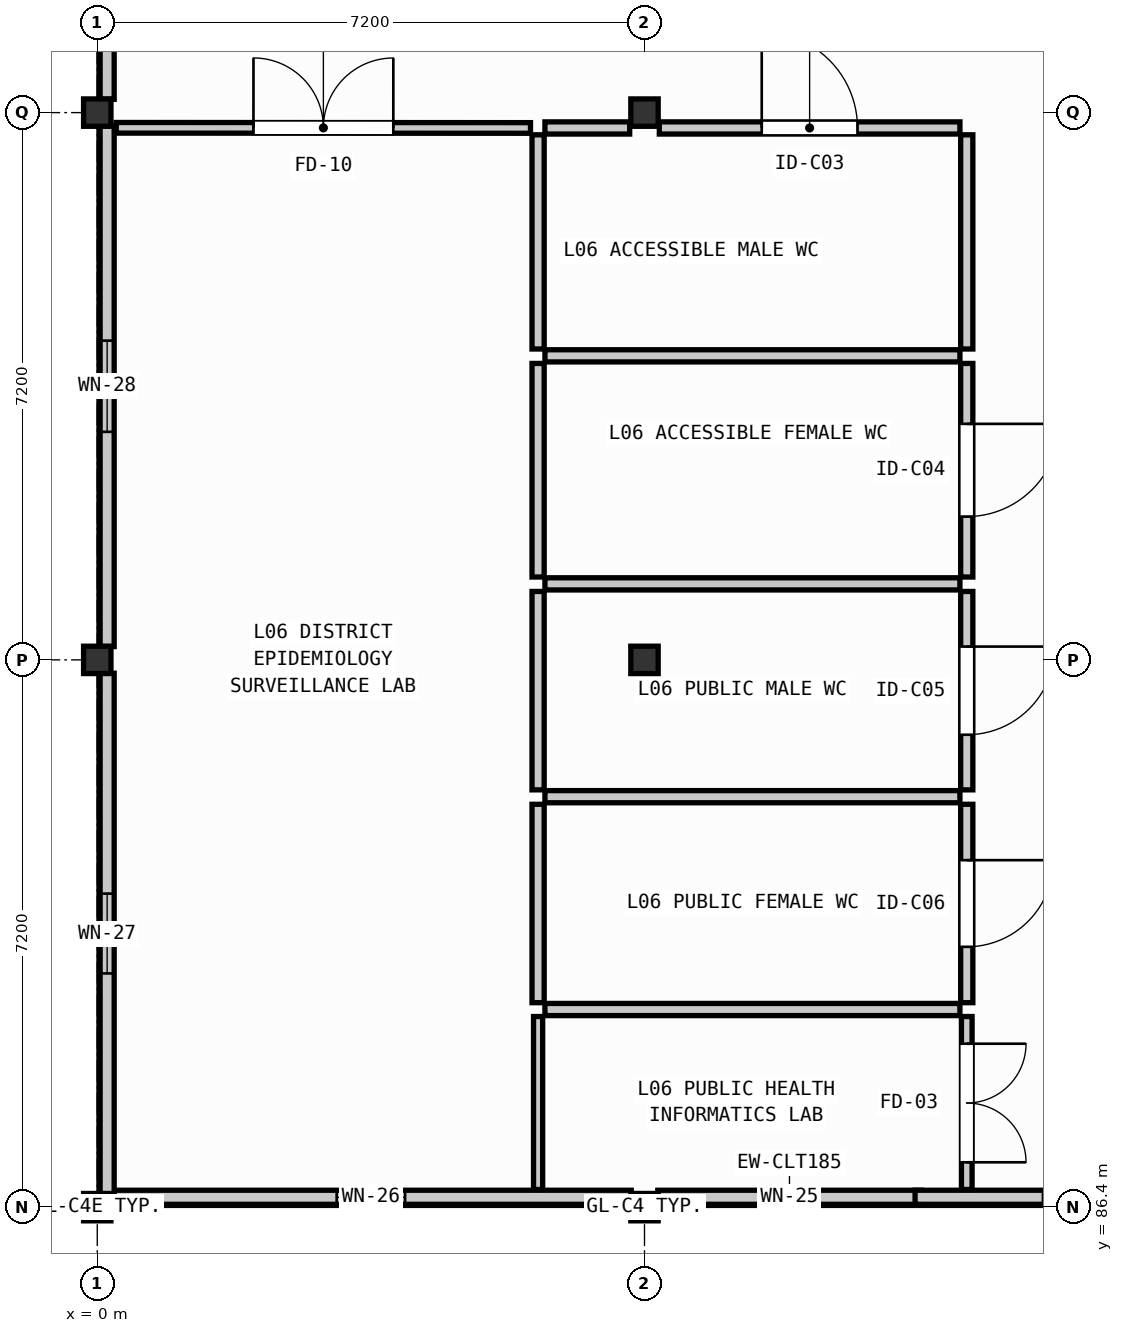
"""IFC4 building model, lengths in metres.
Left out: names, types, materials, properties, quantities, classifications, styles, units other than length and angle.
Written with IfcOpenShell. Run it as: python <this file> out.ifc"""

import sys

from ifc_helpers import new_model, si_unit, direction, frame, frame_2d, origin, origin_2d, place, context, subcontext, project, spatial, rectangle, extrude, element, fill, save


model = new_model("IFC4")
c1 = context("Model", 3, precision=1e-05, world=origin(), true_north=direction((0.0, 1.0)))
c2 = subcontext(c1, "Body", "Model", "MODEL_VIEW")
j1 = project(units=[si_unit("LENGTHUNIT", "METRE"), si_unit("PLANEANGLEUNIT", "RADIAN")], contexts=[c1])
p1 = place(None, origin())
s1 = spatial("IfcSite", under=j1, at=p1, CompositionType="ELEMENT")
p2 = place(p1, origin())
s2 = spatial("IfcBuilding", under=s1, at=p2, CompositionType="ELEMENT")
p3 = place(p2, frame((0.0, 0.0, 21.6)))
s3 = spatial("IfcBuildingStorey", under=s2, at=p3, CompositionType="ELEMENT", Elevation=21.6)
for number, where, z_axis, x_axis in (
    (1, (0.0, 86.4, 0.0), (0.0, 0.0, 1.0), (1.0, 0.0, 0.0)),
    (2, (0.0, 93.6, 0.0), (0.0, 0.0, 1.0), (1.0, 0.0, 0.0)),
    (3, (0.0, 100.8, 0.0), (0.0, 0.0, 1.0), (1.0, 0.0, 0.0)),
    (4, (7.2, 86.4, 0.0), (0.0, 0.0, 1.0), (1.0, 0.0, 0.0)),
    (5, (7.2, 93.6, 0.0), (0.0, 0.0, 1.0), (1.0, 0.0, 0.0)),
    (6, (7.2, 100.8, 0.0), (0.0, 0.0, 1.0), (1.0, 0.0, 0.0)),
):
    element("IfcColumn", number, at=place(p3, frame(where, z_axis=z_axis, x_axis=x_axis)), inside=s3, PredefinedType="COLUMN", context=c2, shape_type="SweptSolid", body=[
        extrude(rectangle(XDim=0.36, YDim=0.36, at=origin_2d()), origin(), (0.0, 0.0, 1.0), 3.69),
    ])
p4 = place(p3, frame((10.84, 86.53, 0.0), z_axis=(0.0, 0.0, 1.0), x_axis=(-1.0, 0.0, 0.0)))
e7 = element("IfcWall", 7, at=p4, inside=s3, PredefinedType="SOLIDWALL", context=c2, shape_type="SweptSolid", body=[
    extrude(rectangle(XDim=3.465, YDim=0.185, at=frame_2d((1.732, 0.0))), origin(), (0.0, 0.0, 1.0), 3.05),
])
p5 = place(p4, frame((1.357, 0.0, 0.95)))
e8 = element("IfcOpeningElement", 8, at=p5, cuts=e7, PredefinedType="OPENING", context=c2, shape_type="SweptSolid", body=[
    extrude(rectangle(XDim=0.75, YDim=1.25, at=frame_2d((0.375, 0.625))), frame((0.0, 0.103, 0.0), z_axis=(0.0, -1.0, 0.0), x_axis=(1.0, 0.0, 0.0)), (0.0, 0.0, 1.0), 0.205),
])
p6 = place(p3, frame((7.025, 86.53, 0.0), z_axis=(0.0, 0.0, 1.0), x_axis=(-1.0, 0.0, 0.0)))
e9 = element("IfcWall", 9, at=p6, inside=s3, PredefinedType="SOLIDWALL", context=c2, shape_type="SweptSolid", body=[
    extrude(rectangle(XDim=6.85, YDim=0.185, at=frame_2d((3.425, 0.0))), origin(), (0.0, 0.0, 1.0), 3.05),
])
p7 = place(p6, frame((2.975, 0.0, 0.95)))
e10 = element("IfcOpeningElement", 10, at=p7, cuts=e9, PredefinedType="OPENING", context=c2, shape_type="SweptSolid", body=[
    extrude(rectangle(XDim=0.9, YDim=1.25, at=frame_2d((0.45, 0.625))), frame((0.0, 0.103, 0.0), z_axis=(0.0, -1.0, 0.0), x_axis=(1.0, 0.0, 0.0)), (0.0, 0.0, 1.0), 0.205),
])
p8 = place(p3, frame((0.13, 86.575, 0.0), z_axis=(0.0, 0.0, 1.0), x_axis=(0.0, 1.0, 0.0)))
e11 = element("IfcWall", 11, at=p8, inside=s3, PredefinedType="SOLIDWALL", context=c2, shape_type="SweptSolid", body=[
    extrude(rectangle(XDim=6.85, YDim=0.185, at=frame_2d((3.425, 0.0))), origin(), (0.0, 0.0, 1.0), 3.05),
])
p9 = place(p8, frame((2.9, 0.0, 0.95)))
e12 = element("IfcOpeningElement", 12, at=p9, cuts=e11, PredefinedType="OPENING", context=c2, shape_type="SweptSolid", body=[
    extrude(rectangle(XDim=1.05, YDim=1.25, at=frame_2d((0.525, 0.625))), frame((0.0, 0.103, 0.0), z_axis=(0.0, -1.0, 0.0), x_axis=(1.0, 0.0, 0.0)), (0.0, 0.0, 1.0), 0.205),
])
p10 = place(p3, frame((0.13, 93.775, 0.0), z_axis=(0.0, 0.0, 1.0), x_axis=(0.0, 1.0, 0.0)))
e13 = element("IfcWall", 13, at=p10, inside=s3, PredefinedType="SOLIDWALL", context=c2, shape_type="SweptSolid", body=[
    extrude(rectangle(XDim=6.85, YDim=0.185, at=frame_2d((3.425, 0.0))), origin(), (0.0, 0.0, 1.0), 3.05),
])
p11 = place(p10, frame((2.825, 0.0, 0.95)))
e14 = element("IfcOpeningElement", 14, at=p11, cuts=e13, PredefinedType="OPENING", context=c2, shape_type="SweptSolid", body=[
    extrude(rectangle(XDim=1.2, YDim=1.25, at=frame_2d((0.6, 0.625))), frame((0.0, 0.103, 0.0), z_axis=(0.0, -1.0, 0.0), x_axis=(1.0, 0.0, 0.0)), (0.0, 0.0, 1.0), 0.205),
])
p12 = place(p3, frame((0.13, 100.975, 0.0), z_axis=(0.0, 0.0, 1.0), x_axis=(0.0, 1.0, 0.0)))
e15 = element("IfcWall", 15, at=p12, inside=s3, PredefinedType="SOLIDWALL", context=c2, shape_type="SweptSolid", body=[
    extrude(rectangle(XDim=6.85, YDim=0.185, at=frame_2d((3.425, 0.0))), origin(), (0.0, 0.0, 1.0), 3.05),
])
p13 = place(p12, frame((3.3, 0.0, 0.95)))
e16 = element("IfcOpeningElement", 16, at=p13, cuts=e15, PredefinedType="OPENING", context=c2, shape_type="SweptSolid", body=[
    extrude(rectangle(XDim=1.35, YDim=1.25, at=frame_2d((0.675, 0.625))), frame((0.0, 0.103, 0.0), z_axis=(0.0, -1.0, 0.0), x_axis=(1.0, 0.0, 0.0)), (0.0, 0.0, 1.0), 0.205),
])
p14 = place(p3, frame((14.225, 86.53, 0.0), z_axis=(0.0, 0.0, 1.0), x_axis=(-1.0, 0.0, 0.0)))
e17 = element("IfcWall", 17, at=p14, inside=s3, PredefinedType="SOLIDWALL", context=c2, shape_type="SweptSolid", body=[
    extrude(rectangle(XDim=3.465, YDim=0.185, at=frame_2d((1.732, 0.0))), origin(), (0.0, 0.0, 1.0), 3.05),
])
p15 = place(p14, frame((0.583, 0.0, 0.95)))
e18 = element("IfcOpeningElement", 18, at=p15, cuts=e17, PredefinedType="OPENING", context=c2, shape_type="SweptSolid", body=[
    extrude(rectangle(XDim=1.2, YDim=1.55, at=frame_2d((0.6, 0.775))), frame((0.0, 0.103, 0.0), z_axis=(0.0, -1.0, 0.0), x_axis=(1.0, 0.0, 0.0)), (0.0, 0.0, 1.0), 0.205),
])
p16 = place(p3, frame((5.89, 100.598, 0.0), z_axis=(0.0, 0.0, 1.0), x_axis=(1.0, 0.0, 0.0)))
e19 = element("IfcWall", 19, at=p16, inside=s3, PredefinedType="PLUMBINGWALL", context=c2, shape_type="SweptSolid", body=[
    extrude(rectangle(XDim=1.115, YDim=0.16, at=frame_2d((0.558, 0.0))), origin(), (0.0, 0.0, 1.0), 3.05),
])
p17 = place(p3, frame((7.395, 100.598, 0.0), z_axis=(0.0, 0.0, 1.0), x_axis=(1.0, 0.0, 0.0)))
e20 = element("IfcWall", 20, at=p17, inside=s3, PredefinedType="PLUMBINGWALL", context=c2, shape_type="SweptSolid", body=[
    extrude(rectangle(XDim=3.955, YDim=0.16, at=frame_2d((1.978, 0.0))), origin(), (0.0, 0.0, 1.0), 3.05),
])
p18 = place(p17, frame((1.347, 0.0, 0.0)))
e21 = element("IfcOpeningElement", 21, at=p18, cuts=e20, PredefinedType="OPENING", context=c2, shape_type="SweptSolid", body=[
    extrude(rectangle(XDim=1.26, YDim=2.28, at=frame_2d((0.63, 1.14))), frame((0.0, 0.09, 0.0), z_axis=(0.0, -1.0, 0.0), x_axis=(1.0, 0.0, 0.0)), (0.0, 0.0, 1.0), 0.18),
])
p19 = place(p3, frame((11.44, 100.508, 0.0), z_axis=(0.0, 0.0, 1.0), x_axis=(0.0, -1.0, 0.0)))
e22 = element("IfcWall", 22, at=p19, inside=s3, PredefinedType="PLUMBINGWALL", context=c2, shape_type="SweptSolid", body=[
    extrude(rectangle(XDim=2.818, YDim=0.16, at=frame_2d((1.409, 0.0))), origin(), (0.0, 0.0, 1.0), 3.05),
])
p20 = place(p3, frame((11.35, 97.6, 0.0), z_axis=(0.0, 0.0, 1.0), x_axis=(-1.0, 0.0, 0.0)))
e23 = element("IfcWall", 23, at=p20, inside=s3, PredefinedType="PLUMBINGWALL", context=c2, shape_type="SweptSolid", body=[
    extrude(rectangle(XDim=5.46, YDim=0.16, at=frame_2d((2.73, 0.0))), origin(), (0.0, 0.0, 1.0), 3.13),
])
p21 = place(p3, frame((5.8, 97.69, 0.0), z_axis=(0.0, 0.0, 1.0), x_axis=(0.0, 1.0, 0.0)))
e24 = element("IfcWall", 24, at=p21, inside=s3, PredefinedType="PLUMBINGWALL", context=c2, shape_type="SweptSolid", body=[
    extrude(rectangle(XDim=2.818, YDim=0.16, at=frame_2d((1.409, 0.0))), origin(), (0.0, 0.0, 1.0), 3.05),
])
p22 = place(p3, frame((11.44, 97.5, 0.0), z_axis=(0.0, 0.0, 1.0), x_axis=(0.0, -1.0, 0.0)))
e25 = element("IfcWall", 25, at=p22, inside=s3, PredefinedType="PLUMBINGWALL", context=c2, shape_type="SweptSolid", body=[
    extrude(rectangle(XDim=2.81, YDim=0.16, at=frame_2d((1.405, 0.0))), origin(), (0.0, 0.0, 1.0), 3.67),
])
p23 = place(p22, frame((0.795, 0.0, 0.0)))
e26 = element("IfcOpeningElement", 26, at=p23, cuts=e25, PredefinedType="OPENING", context=c2, shape_type="SweptSolid", body=[
    extrude(rectangle(XDim=1.22, YDim=2.18, at=frame_2d((0.61, 1.09))), frame((0.0, 0.09, 0.0), z_axis=(0.0, -1.0, 0.0), x_axis=(1.0, 0.0, 0.0)), (0.0, 0.0, 1.0), 0.18),
])
p24 = place(p3, frame((11.35, 94.6, 0.0), z_axis=(0.0, 0.0, 1.0), x_axis=(-1.0, 0.0, 0.0)))
e27 = element("IfcWall", 27, at=p24, inside=s3, PredefinedType="PLUMBINGWALL", context=c2, shape_type="SweptSolid", body=[
    extrude(rectangle(XDim=5.46, YDim=0.16, at=frame_2d((2.73, 0.0))), origin(), (0.0, 0.0, 1.0), 3.13),
])
p25 = place(p3, frame((5.8, 94.69, 0.0), z_axis=(0.0, 0.0, 1.0), x_axis=(0.0, 1.0, 0.0)))
e28 = element("IfcWall", 28, at=p25, inside=s3, PredefinedType="PLUMBINGWALL", context=c2, shape_type="SweptSolid", body=[
    extrude(rectangle(XDim=2.81, YDim=0.16, at=frame_2d((1.405, 0.0))), origin(), (0.0, 0.0, 1.0), 3.67),
])
p26 = place(p3, frame((11.44, 94.5, 0.0), z_axis=(0.0, 0.0, 1.0), x_axis=(0.0, -1.0, 0.0)))
e29 = element("IfcWall", 29, at=p26, inside=s3, PredefinedType="PLUMBINGWALL", context=c2, shape_type="SweptSolid", body=[
    extrude(rectangle(XDim=2.61, YDim=0.16, at=frame_2d((1.305, 0.0))), origin(), (0.0, 0.0, 1.0), 3.05),
])
p27 = place(p26, frame((0.725, 0.0, 0.0)))
e30 = element("IfcOpeningElement", 30, at=p27, cuts=e29, PredefinedType="OPENING", context=c2, shape_type="SweptSolid", body=[
    extrude(rectangle(XDim=1.16, YDim=2.26, at=frame_2d((0.58, 1.13))), frame((0.0, 0.09, 0.0), z_axis=(0.0, -1.0, 0.0), x_axis=(1.0, 0.0, 0.0)), (0.0, 0.0, 1.0), 0.18),
])
p28 = place(p3, frame((11.35, 91.8, 0.0), z_axis=(0.0, 0.0, 1.0), x_axis=(-1.0, 0.0, 0.0)))
e31 = element("IfcWall", 31, at=p28, inside=s3, PredefinedType="PLUMBINGWALL", context=c2, shape_type="SweptSolid", body=[
    extrude(rectangle(XDim=5.46, YDim=0.16, at=frame_2d((2.73, 0.0))), origin(), (0.0, 0.0, 1.0), 3.13),
])
p29 = place(p3, frame((5.8, 91.89, 0.0), z_axis=(0.0, 0.0, 1.0), x_axis=(0.0, 1.0, 0.0)))
e32 = element("IfcWall", 32, at=p29, inside=s3, PredefinedType="PLUMBINGWALL", context=c2, shape_type="SweptSolid", body=[
    extrude(rectangle(XDim=2.61, YDim=0.16, at=frame_2d((1.305, 0.0))), origin(), (0.0, 0.0, 1.0), 3.05),
])
p30 = place(p3, frame((11.44, 91.7, 0.0), z_axis=(0.0, 0.0, 1.0), x_axis=(0.0, -1.0, 0.0)))
e33 = element("IfcWall", 33, at=p30, inside=s3, PredefinedType="PLUMBINGWALL", context=c2, shape_type="SweptSolid", body=[
    extrude(rectangle(XDim=2.61, YDim=0.16, at=frame_2d((1.305, 0.0))), origin(), (0.0, 0.0, 1.0), 3.67),
])
p31 = place(p30, frame((0.735, 0.0, 0.0)))
e34 = element("IfcOpeningElement", 34, at=p31, cuts=e33, PredefinedType="OPENING", context=c2, shape_type="SweptSolid", body=[
    extrude(rectangle(XDim=1.14, YDim=2.12, at=frame_2d((0.57, 1.06))), frame((0.0, 0.09, 0.0), z_axis=(0.0, -1.0, 0.0), x_axis=(1.0, 0.0, 0.0)), (0.0, 0.0, 1.0), 0.18),
])
p32 = place(p3, frame((11.35, 89.0, 0.0), z_axis=(0.0, 0.0, 1.0), x_axis=(-1.0, 0.0, 0.0)))
e35 = element("IfcWall", 35, at=p32, inside=s3, PredefinedType="PLUMBINGWALL", context=c2, shape_type="SweptSolid", body=[
    extrude(rectangle(XDim=5.46, YDim=0.16, at=frame_2d((2.73, 0.0))), origin(), (0.0, 0.0, 1.0), 3.13),
])
p33 = place(p3, frame((5.8, 89.09, 0.0), z_axis=(0.0, 0.0, 1.0), x_axis=(0.0, 1.0, 0.0)))
e36 = element("IfcWall", 36, at=p33, inside=s3, PredefinedType="PLUMBINGWALL", context=c2, shape_type="SweptSolid", body=[
    extrude(rectangle(XDim=2.61, YDim=0.16, at=frame_2d((1.305, 0.0))), origin(), (0.0, 0.0, 1.0), 3.67),
])
p34 = place(p3, frame((0.25, 100.6, 0.0), z_axis=(0.0, 0.0, 1.0), x_axis=(0.999999918726, -0.000403171584, 0.0)))
e37 = element("IfcWall", 37, at=p34, inside=s3, PredefinedType="PARTITIONING", context=c2, shape_type="SweptSolid", body=[
    extrude(rectangle(XDim=5.45, YDim=0.14, at=frame_2d((2.725, 0.0))), origin(), (0.0, 0.0, 1.0), 3.05),
])
p35 = place(p34, frame((1.805, 0.0, 0.0)))
e38 = element("IfcOpeningElement", 38, at=p35, cuts=e37, PredefinedType="OPENING", context=c2, shape_type="SweptSolid", body=[
    extrude(rectangle(XDim=1.84, YDim=2.28, at=frame_2d((0.92, 1.14))), frame((0.0, 0.08, 0.0), z_axis=(0.0, -1.0, 0.0), x_axis=(1.0, 0.0, 0.0)), (0.0, 0.0, 1.0), 0.16),
])
p36 = place(p3, frame((11.44, 88.908, 0.0), z_axis=(0.0, 0.0, 1.0), x_axis=(0.0, -1.0, 0.0)))
e39 = element("IfcWall", 39, at=p36, inside=s3, PredefinedType="PARTITIONING", context=c2, shape_type="SweptSolid", body=[
    extrude(rectangle(XDim=2.275, YDim=0.14, at=frame_2d((1.138, 0.0))), origin(), (0.0, 0.0, 1.0), 3.05),
])
p37 = place(p36, frame((0.358, 0.0, 0.0)))
e40 = element("IfcOpeningElement", 40, at=p37, cuts=e39, PredefinedType="OPENING", context=c2, shape_type="SweptSolid", body=[
    extrude(rectangle(XDim=1.56, YDim=2.22, at=frame_2d((0.78, 1.11))), frame((0.0, 0.08, 0.0), z_axis=(0.0, -1.0, 0.0), x_axis=(1.0, 0.0, 0.0)), (0.0, 0.0, 1.0), 0.16),
])
p38 = place(p3, frame((5.8, 86.633, 0.0), z_axis=(0.0, 0.0, 1.0), x_axis=(0.0, 1.0, 0.0)))
e41 = element("IfcWall", 41, at=p38, inside=s3, PredefinedType="PARTITIONING", context=c2, shape_type="SweptSolid", body=[
    extrude(rectangle(XDim=2.275, YDim=0.12, at=frame_2d((1.138, 0.0))), origin(), (0.0, 0.0, 1.0), 3.05),
])
p39 = place(p5, origin())
e42 = element("IfcWindow", 42, at=p39, inside=s3, PartitioningType="SINGLE_PANEL", PredefinedType="WINDOW", context=c2, shape_type="SweptSolid", body=[
    extrude(rectangle(XDim=0.75, YDim=1.25, at=frame_2d((0.375, 0.625))), frame((0.0, 0.03, 0.0), z_axis=(0.0, -1.0, 0.0), x_axis=(1.0, 0.0, 0.0)), (0.0, 0.0, 1.0), 0.06),
])
fill(e8, e42)
p40 = place(p7, origin())
e43 = element("IfcWindow", 43, at=p40, inside=s3, PartitioningType="SINGLE_PANEL", PredefinedType="WINDOW", context=c2, shape_type="SweptSolid", body=[
    extrude(rectangle(XDim=0.9, YDim=1.25, at=frame_2d((0.45, 0.625))), frame((0.0, 0.03, 0.0), z_axis=(0.0, -1.0, 0.0), x_axis=(1.0, 0.0, 0.0)), (0.0, 0.0, 1.0), 0.06),
])
fill(e10, e43)
p41 = place(p9, origin())
e44 = element("IfcWindow", 44, at=p41, inside=s3, PartitioningType="SINGLE_PANEL", PredefinedType="WINDOW", context=c2, shape_type="SweptSolid", body=[
    extrude(rectangle(XDim=1.05, YDim=1.25, at=frame_2d((0.525, 0.625))), frame((0.0, 0.03, 0.0), z_axis=(0.0, -1.0, 0.0), x_axis=(1.0, 0.0, 0.0)), (0.0, 0.0, 1.0), 0.06),
])
fill(e12, e44)
p42 = place(p11, origin())
e45 = element("IfcWindow", 45, at=p42, inside=s3, PartitioningType="SINGLE_PANEL", PredefinedType="WINDOW", context=c2, shape_type="SweptSolid", body=[
    extrude(rectangle(XDim=1.2, YDim=1.25, at=frame_2d((0.6, 0.625))), frame((0.0, 0.03, 0.0), z_axis=(0.0, -1.0, 0.0), x_axis=(1.0, 0.0, 0.0)), (0.0, 0.0, 1.0), 0.06),
])
fill(e14, e45)
p43 = place(p18, origin())
e46 = element("IfcDoor", 46, at=p43, inside=s3, OperationType="SINGLE_SWING_LEFT", PredefinedType="DOOR", context=c2, shape_type="SweptSolid", body=[
    extrude(rectangle(XDim=1.26, YDim=2.28, at=frame_2d((0.63, 1.14))), frame((0.0, 0.025, 0.0), z_axis=(0.0, -1.0, 0.0), x_axis=(1.0, 0.0, 0.0)), (0.0, 0.0, 1.0), 0.05),
])
fill(e21, e46)
p44 = place(p23, origin())
e47 = element("IfcDoor", 47, at=p44, inside=s3, OperationType="SINGLE_SWING_RIGHT", PredefinedType="DOOR", context=c2, shape_type="SweptSolid", body=[
    extrude(rectangle(XDim=1.22, YDim=2.18, at=frame_2d((0.61, 1.09))), frame((0.0, 0.025, 0.0), z_axis=(0.0, -1.0, 0.0), x_axis=(1.0, 0.0, 0.0)), (0.0, 0.0, 1.0), 0.05),
])
fill(e26, e47)
p45 = place(p27, origin())
e48 = element("IfcDoor", 48, at=p45, inside=s3, OperationType="SINGLE_SWING_LEFT", PredefinedType="DOOR", context=c2, shape_type="SweptSolid", body=[
    extrude(rectangle(XDim=1.16, YDim=2.26, at=frame_2d((0.58, 1.13))), frame((0.0, 0.025, 0.0), z_axis=(0.0, -1.0, 0.0), x_axis=(1.0, 0.0, 0.0)), (0.0, 0.0, 1.0), 0.05),
])
fill(e30, e48)
p46 = place(p31, origin())
e49 = element("IfcDoor", 49, at=p46, inside=s3, OperationType="SINGLE_SWING_RIGHT", PredefinedType="DOOR", context=c2, shape_type="SweptSolid", body=[
    extrude(rectangle(XDim=1.14, YDim=2.12, at=frame_2d((0.57, 1.06))), frame((0.0, 0.025, 0.0), z_axis=(0.0, -1.0, 0.0), x_axis=(1.0, 0.0, 0.0)), (0.0, 0.0, 1.0), 0.05),
])
fill(e34, e49)
p47 = place(p35, origin())
e50 = element("IfcDoor", 50, at=p47, inside=s3, OperationType="DOUBLE_DOOR_SINGLE_SWING", PredefinedType="DOOR", context=c2, shape_type="SweptSolid", body=[
    extrude(rectangle(XDim=1.84, YDim=2.28, at=frame_2d((0.92, 1.14))), frame((0.0, 0.025, 0.0), z_axis=(0.0, -1.0, 0.0), x_axis=(1.0, 0.0, 0.0)), (0.0, 0.0, 1.0), 0.05),
])
fill(e38, e50)
p48 = place(p37, origin())
e51 = element("IfcDoor", 51, at=p48, inside=s3, OperationType="DOUBLE_DOOR_SINGLE_SWING", PredefinedType="DOOR", context=c2, shape_type="SweptSolid", body=[
    extrude(rectangle(XDim=1.56, YDim=2.22, at=frame_2d((0.78, 1.11))), frame((0.0, 0.025, 0.0), z_axis=(0.0, -1.0, 0.0), x_axis=(1.0, 0.0, 0.0)), (0.0, 0.0, 1.0), 0.05),
])
fill(e40, e51)
save(model, sys.argv[1])
